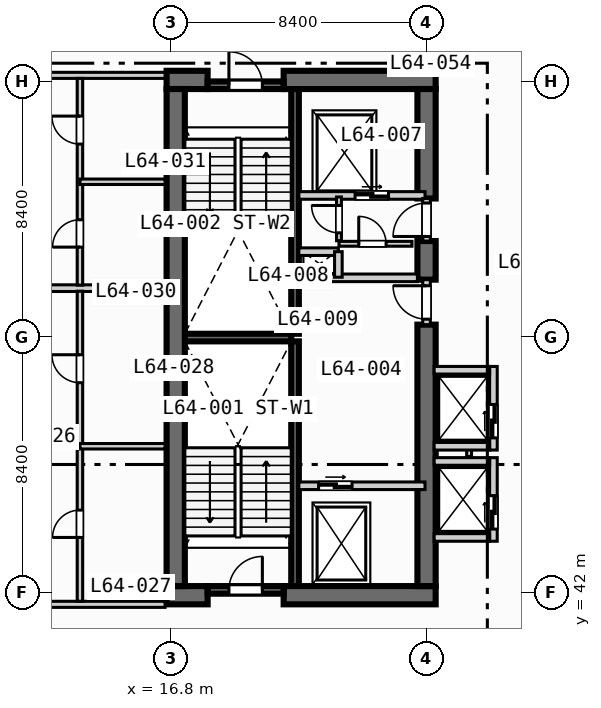
"""IFC4 building model, lengths in metres.
Left out: names, types, materials, properties, quantities, classifications, styles, units other than length and angle.
Written with IfcOpenShell. Run it as: python <this file> out.ifc"""

import sys

from ifc_helpers import new_model, si_unit, direction, frame, frame_2d, origin, place, context, subcontext, project, spatial, rectangle, extrude, element, fill, save


model = new_model("IFC4")
c1 = context("Model", 3, precision=1e-05, world=origin(), true_north=direction((0.0, 1.0)))
c2 = subcontext(c1, "Body", "Model", "MODEL_VIEW")
j1 = project(units=[si_unit("LENGTHUNIT", "METRE"), si_unit("PLANEANGLEUNIT", "RADIAN")], contexts=[c1])
p1 = place(None, origin())
s1 = spatial("IfcSite", under=j1, at=p1, CompositionType="ELEMENT")
p2 = place(p1, origin())
s2 = spatial("IfcBuilding", under=s1, at=p2, CompositionType="ELEMENT")
p3 = place(p2, frame((0.0, 0.0, 260.1)))
s3 = spatial("IfcBuildingStorey", under=s2, at=p3, CompositionType="ELEMENT", Elevation=260.1)
for number, where, z_axis, x_axis in (
    (1, (20.875, 42.2, 0.0), (0.0, 0.0, 1.0), (0.0, 1.0, 0.0)),
    (2, (20.875, 50.5, 0.0), (0.0, 0.0, 1.0), (0.0, 1.0, 0.0)),
):
    element("IfcWall", number, at=place(p3, frame(where, z_axis=z_axis, x_axis=x_axis)), inside=s3, PredefinedType="SOLIDWALL", context=c2, shape_type="SweptSolid", body=[
        extrude(rectangle(XDim=8.05, YDim=0.25, at=frame_2d((4.025, 0.0))), origin(), (0.0, 0.0, 1.0), 3.47),
    ])
p4 = place(p3, frame((17.25, 50.375, 0.0), z_axis=(0.0, 0.0, 1.0), x_axis=(1.0, 0.0, 0.0)))
e3 = element("IfcWall", 3, at=p4, inside=s3, PredefinedType="SOLIDWALL", context=c2, shape_type="SweptSolid", body=[
    extrude(rectangle(XDim=3.5, YDim=0.25, at=frame_2d((1.75, 0.0))), origin(), (0.0, 0.0, 1.0), 3.47),
])
p5 = place(p3, frame((16.65, 41.9, 0.0), z_axis=(0.0, 0.0, 1.0), x_axis=(1.0, 0.0, 0.0)))
e4 = element("IfcWall", 4, at=p5, inside=s3, PredefinedType="SHEAR", context=c2, shape_type="SweptSolid", body=[
    extrude(rectangle(XDim=1.35, YDim=0.6, at=frame_2d((0.675, 0.0))), origin(), (0.0, 0.0, 1.0), 3.47),
])
p6 = place(p3, frame((20.5, 41.9, 0.0), z_axis=(0.0, 0.0, 1.0), x_axis=(1.0, 0.0, 0.0)))
e5 = element("IfcWall", 5, at=p6, inside=s3, PredefinedType="SHEAR", context=c2, shape_type="SweptSolid", body=[
    extrude(rectangle(XDim=5.0, YDim=0.6, at=frame_2d((2.5, 0.0))), origin(), (0.0, 0.0, 1.0), 3.47),
])
p7 = place(p3, frame((16.65, 58.85, 0.0), z_axis=(0.0, 0.0, 1.0), x_axis=(1.0, 0.0, 0.0)))
e6 = element("IfcWall", 6, at=p7, inside=s3, PredefinedType="SHEAR", context=c2, shape_type="SweptSolid", body=[
    extrude(rectangle(XDim=1.35, YDim=0.6, at=frame_2d((0.675, 0.0))), origin(), (0.0, 0.0, 1.0), 3.47),
])
p8 = place(p3, frame((20.5, 58.85, 0.0), z_axis=(0.0, 0.0, 1.0), x_axis=(1.0, 0.0, 0.0)))
e7 = element("IfcWall", 7, at=p8, inside=s3, PredefinedType="SHEAR", context=c2, shape_type="SweptSolid", body=[
    extrude(rectangle(XDim=5.0, YDim=0.6, at=frame_2d((2.5, 0.0))), origin(), (0.0, 0.0, 1.0), 3.47),
])
p9 = place(p3, frame((16.95, 42.2, 0.0), z_axis=(0.0, 0.0, 1.0), x_axis=(0.0, 1.0, 0.0)))
e8 = element("IfcWall", 8, at=p9, inside=s3, PredefinedType="SHEAR", context=c2, shape_type="SweptSolid", body=[
    extrude(rectangle(XDim=16.35, YDim=0.6, at=frame_2d((8.175, 0.0))), origin(), (0.0, 0.0, 1.0), 3.47),
])
p10 = place(p3, frame((25.2, 42.2, 0.0), z_axis=(0.0, 0.0, 1.0), x_axis=(0.0, 1.0, 0.0)))
e9 = element("IfcWall", 9, at=p10, inside=s3, PredefinedType="SHEAR", context=c2, shape_type="SweptSolid", body=[
    extrude(rectangle(XDim=8.6, YDim=0.6, at=frame_2d((4.3, 0.0))), origin(), (0.0, 0.0, 1.0), 3.47),
])
p11 = place(p3, frame((25.2, 52.28, 0.0), z_axis=(0.0, 0.0, 1.0), x_axis=(0.0, 1.0, 0.0)))
e10 = element("IfcWall", 10, at=p11, inside=s3, PredefinedType="SHEAR", context=c2, shape_type="SweptSolid", body=[
    extrude(rectangle(XDim=1.27, YDim=0.6, at=frame_2d((0.635, 0.0))), origin(), (0.0, 0.0, 1.0), 3.47),
])
p12 = place(p3, frame((25.2, 54.95, 0.0), z_axis=(0.0, 0.0, 1.0), x_axis=(0.0, 1.0, 0.0)))
e11 = element("IfcWall", 11, at=p12, inside=s3, PredefinedType="SHEAR", context=c2, shape_type="SweptSolid", body=[
    extrude(rectangle(XDim=3.6, YDim=0.6, at=frame_2d((1.8, 0.0))), origin(), (0.0, 0.0, 1.0), 3.47),
])
p13 = place(p3, frame((18.0, 42.075, 0.0), z_axis=(0.0, 0.0, 1.0), x_axis=(1.0, 0.0, 0.0)))
e12 = element("IfcWall", 12, at=p13, inside=s3, PredefinedType="SOLIDWALL", context=c2, shape_type="SweptSolid", body=[
    extrude(rectangle(XDim=2.5, YDim=0.25, at=frame_2d((1.25, 0.0))), origin(), (0.0, 0.0, 1.0), 3.47),
])
p14 = place(p13, frame((0.7, 0.0, 0.0)))
e13 = element("IfcOpeningElement", 13, at=p14, cuts=e12, PredefinedType="OPENING", context=c2, shape_type="SweptSolid", body=[
    extrude(rectangle(XDim=1.1, YDim=2.15, at=frame_2d((0.55, 1.075))), frame((0.0, 0.135, 0.0), z_axis=(0.0, -1.0, 0.0), x_axis=(1.0, 0.0, 0.0)), (0.0, 0.0, 1.0), 0.27),
])
p15 = place(p3, frame((18.0, 58.675, 0.0), z_axis=(0.0, 0.0, 1.0), x_axis=(1.0, 0.0, 0.0)))
e14 = element("IfcWall", 14, at=p15, inside=s3, PredefinedType="SOLIDWALL", context=c2, shape_type="SweptSolid", body=[
    extrude(rectangle(XDim=2.5, YDim=0.25, at=frame_2d((1.25, 0.0))), origin(), (0.0, 0.0, 1.0), 3.47),
])
p16 = place(p15, frame((0.7, 0.0, 0.0)))
e15 = element("IfcOpeningElement", 15, at=p16, cuts=e14, PredefinedType="OPENING", context=c2, shape_type="SweptSolid", body=[
    extrude(rectangle(XDim=1.1, YDim=2.15, at=frame_2d((0.55, 1.075))), frame((0.0, 0.135, 0.0), z_axis=(0.0, -1.0, 0.0), x_axis=(1.0, 0.0, 0.0)), (0.0, 0.0, 1.0), 0.27),
])
p17 = place(p3, frame((21.0, 45.5, 0.0), z_axis=(0.0, 0.0, 1.0), x_axis=(1.0, 0.0, 0.0)))
e16 = element("IfcWall", 16, at=p17, inside=s3, PredefinedType="SOLIDWALL", context=c2, shape_type="SweptSolid", body=[
    extrude(rectangle(XDim=4.15, YDim=0.25, at=frame_2d((2.075, 0.0))), origin(), (0.0, 0.0, 1.0), 3.47),
])
p18 = place(p17, frame((0.65, 0.0, 0.0)))
e17 = element("IfcOpeningElement", 17, at=p18, cuts=e16, PredefinedType="OPENING", context=c2, shape_type="SweptSolid", body=[
    extrude(rectangle(XDim=1.1, YDim=2.15, at=frame_2d((0.55, 1.075))), frame((0.0, 0.135, 0.0), z_axis=(0.0, -1.0, 0.0), x_axis=(1.0, 0.0, 0.0)), (0.0, 0.0, 1.0), 0.27),
])
p19 = place(p3, frame((25.2, 50.8, 0.0), z_axis=(0.0, 0.0, 1.0), x_axis=(0.0, 1.0, 0.0)))
e18 = element("IfcWall", 18, at=p19, inside=s3, PredefinedType="SOLIDWALL", context=c2, shape_type="SweptSolid", body=[
    extrude(rectangle(XDim=1.48, YDim=0.25, at=frame_2d((0.74, 0.0))), origin(), (0.0, 0.0, 1.0), 3.47),
])
p20 = place(p19, frame((0.18, 0.0, 0.0)))
e19 = element("IfcOpeningElement", 19, at=p20, cuts=e18, PredefinedType="OPENING", context=c2, shape_type="SweptSolid", body=[
    extrude(rectangle(XDim=1.1, YDim=2.15, at=frame_2d((0.55, 1.075))), frame((0.0, 0.135, 0.0), z_axis=(0.0, -1.0, 0.0), x_axis=(1.0, 0.0, 0.0)), (0.0, 0.0, 1.0), 0.27),
])
p21 = place(p3, frame((21.0, 52.34, 0.0), z_axis=(0.0, 0.0, 1.0), x_axis=(1.0, 0.0, 0.0)))
e20 = element("IfcWall", 20, at=p21, inside=s3, PredefinedType="SOLIDWALL", context=c2, shape_type="SweptSolid", body=[
    extrude(rectangle(XDim=3.9, YDim=0.25, at=frame_2d((1.95, 0.0))), origin(), (0.0, 0.0, 1.0), 3.47),
])
p22 = place(p3, frame((21.0, 55.05, 0.0), z_axis=(0.0, 0.0, 1.0), x_axis=(1.0, 0.0, 0.0)))
e21 = element("IfcWall", 21, at=p22, inside=s3, PredefinedType="SOLIDWALL", context=c2, shape_type="SweptSolid", body=[
    extrude(rectangle(XDim=4.15, YDim=0.25, at=frame_2d((2.075, 0.0))), origin(), (0.0, 0.0, 1.0), 3.47),
])
p23 = place(p22, frame((1.85, 0.0, 0.0)))
e22 = element("IfcOpeningElement", 22, at=p23, cuts=e21, PredefinedType="OPENING", context=c2, shape_type="SweptSolid", body=[
    extrude(rectangle(XDim=1.1, YDim=2.15, at=frame_2d((0.55, 1.075))), frame((0.0, 0.135, 0.0), z_axis=(0.0, -1.0, 0.0), x_axis=(1.0, 0.0, 0.0)), (0.0, 0.0, 1.0), 0.27),
])
p24 = place(p3, frame((25.2, 53.55, 0.0), z_axis=(0.0, 0.0, 1.0), x_axis=(0.0, 1.0, 0.0)))
e23 = element("IfcWall", 23, at=p24, inside=s3, PredefinedType="SOLIDWALL", context=c2, shape_type="SweptSolid", body=[
    extrude(rectangle(XDim=1.4, YDim=0.25, at=frame_2d((0.7, 0.0))), origin(), (0.0, 0.0, 1.0), 3.47),
])
p25 = place(p24, frame((0.15, 0.0, 0.0)))
e24 = element("IfcOpeningElement", 24, at=p25, cuts=e23, PredefinedType="OPENING", context=c2, shape_type="SweptSolid", body=[
    extrude(rectangle(XDim=1.1, YDim=2.15, at=frame_2d((0.55, 1.075))), frame((0.0, 0.135, 0.0), z_axis=(0.0, -1.0, 0.0), x_axis=(1.0, 0.0, 0.0)), (0.0, 0.0, 1.0), 0.27),
])
p26 = place(p3, frame((21.0, 53.2, 0.0), z_axis=(0.0, 0.0, 1.0), x_axis=(1.0, 0.0, 0.0)))
e25 = element("IfcWall", 25, at=p26, inside=s3, PredefinedType="SOLIDWALL", context=c2, shape_type="SweptSolid", body=[
    extrude(rectangle(XDim=1.3, YDim=0.25, at=frame_2d((0.65, 0.0))), origin(), (0.0, 0.0, 1.0), 3.47),
])
p27 = place(p3, frame((22.3, 52.36, 0.0), z_axis=(0.0, 0.0, 1.0), x_axis=(0.0, 1.0, 0.0)))
e26 = element("IfcWall", 26, at=p27, inside=s3, PredefinedType="SOLIDWALL", context=c2, shape_type="SweptSolid", body=[
    extrude(rectangle(XDim=0.84, YDim=0.25, at=frame_2d((0.42, 0.0))), origin(), (0.0, 0.0, 1.0), 3.47),
])
p28 = place(p3, frame((22.32, 53.56, 0.0), z_axis=(0.0, 0.0, 1.0), x_axis=(0.0, 1.0, 0.0)))
e27 = element("IfcWall", 27, at=p28, inside=s3, PredefinedType="PARTITIONING", context=c2, shape_type="SweptSolid", body=[
    extrude(rectangle(XDim=1.44, YDim=0.16, at=frame_2d((0.72, 0.0))), origin(), (0.0, 0.0, 1.0), 3.47),
])
p29 = place(p28, frame((0.26, 0.0, 0.0)))
e28 = element("IfcOpeningElement", 28, at=p29, cuts=e27, PredefinedType="OPENING", context=c2, shape_type="SweptSolid", body=[
    extrude(rectangle(XDim=0.9, YDim=2.1, at=frame_2d((0.45, 1.05))), frame((0.0, 0.09, 0.0), z_axis=(0.0, -1.0, 0.0), x_axis=(1.0, 0.0, 0.0)), (0.0, 0.0, 1.0), 0.18),
])
p30 = place(p3, frame((22.32, 53.46, 0.0), z_axis=(0.0, 0.0, 1.0), x_axis=(1.0, 0.0, 0.0)))
e29 = element("IfcWall", 29, at=p30, inside=s3, PredefinedType="PARTITIONING", context=c2, shape_type="SweptSolid", body=[
    extrude(rectangle(XDim=2.4, YDim=0.16, at=frame_2d((1.2, 0.0))), origin(), (0.0, 0.0, 1.0), 3.47),
])
p31 = place(p30, frame((0.65, 0.0, 0.0)))
e30 = element("IfcOpeningElement", 30, at=p31, cuts=e29, PredefinedType="OPENING", context=c2, shape_type="SweptSolid", body=[
    extrude(rectangle(XDim=0.9, YDim=2.1, at=frame_2d((0.45, 1.05))), frame((0.0, 0.09, 0.0), z_axis=(0.0, -1.0, 0.0), x_axis=(1.0, 0.0, 0.0)), (0.0, 0.0, 1.0), 0.18),
])
p32 = place(p3, frame((27.4, 43.675, 0.0), z_axis=(0.0, 0.0, 1.0), x_axis=(0.0, 1.0, 0.0)))
e31 = element("IfcWall", 31, at=p32, inside=s3, PredefinedType="SOLIDWALL", context=c2, shape_type="SweptSolid", body=[
    extrude(rectangle(XDim=2.75, YDim=0.25, at=frame_2d((1.375, 0.0))), origin(), (0.0, 0.0, 1.0), 3.47),
])
p33 = place(p32, frame((0.4, 0.0, 0.0)))
e32 = element("IfcOpeningElement", 32, at=p33, cuts=e31, PredefinedType="OPENING", context=c2, shape_type="SweptSolid", body=[
    extrude(rectangle(XDim=1.1, YDim=2.15, at=frame_2d((0.55, 1.075))), frame((0.0, 0.135, 0.0), z_axis=(0.0, -1.0, 0.0), x_axis=(1.0, 0.0, 0.0)), (0.0, 0.0, 1.0), 0.27),
])
for number, where, z_axis, x_axis in (
    (33, (25.45, 43.8, 0.0), (0.0, 0.0, 1.0), (1.0, 0.0, 0.0)),
    (34, (25.45, 46.3, 0.0), (0.0, 0.0, 1.0), (1.0, 0.0, 0.0)),
):
    element("IfcWall", number, at=place(p3, frame(where, z_axis=z_axis, x_axis=x_axis)), inside=s3, PredefinedType="SOLIDWALL", context=c2, shape_type="SweptSolid", body=[
        extrude(rectangle(XDim=1.825, YDim=0.25, at=frame_2d((0.913, 0.0))), origin(), (0.0, 0.0, 1.0), 3.47),
    ])
p34 = place(p3, frame((26.6, 46.46, 0.0), z_axis=(0.0, 0.0, 1.0), x_axis=(0.0, 1.0, 0.0)))
e35 = element("IfcWall", 35, at=p34, inside=s3, PredefinedType="PARTITIONING", context=c2, shape_type="SweptSolid", body=[
    extrude(rectangle(XDim=0.88, YDim=0.16, at=frame_2d((0.44, 0.0))), origin(), (0.0, 0.0, 1.0), 3.47),
])
p35 = place(p3, frame((27.4, 46.675, 0.0), z_axis=(0.0, 0.0, 1.0), x_axis=(0.0, 1.0, 0.0)))
e36 = element("IfcWall", 36, at=p35, inside=s3, PredefinedType="SOLIDWALL", context=c2, shape_type="SweptSolid", body=[
    extrude(rectangle(XDim=2.75, YDim=0.25, at=frame_2d((1.375, 0.0))), origin(), (0.0, 0.0, 1.0), 3.47),
])
p36 = place(p35, frame((0.4, 0.0, 0.0)))
e37 = element("IfcOpeningElement", 37, at=p36, cuts=e36, PredefinedType="OPENING", context=c2, shape_type="SweptSolid", body=[
    extrude(rectangle(XDim=1.1, YDim=2.15, at=frame_2d((0.55, 1.075))), frame((0.0, 0.135, 0.0), z_axis=(0.0, -1.0, 0.0), x_axis=(1.0, 0.0, 0.0)), (0.0, 0.0, 1.0), 0.27),
])
for number, where, z_axis, x_axis in (
    (38, (25.45, 46.8, 0.0), (0.0, 0.0, 1.0), (1.0, 0.0, 0.0)),
    (39, (25.45, 49.3, 0.0), (0.0, 0.0, 1.0), (1.0, 0.0, 0.0)),
):
    element("IfcWall", number, at=place(p3, frame(where, z_axis=z_axis, x_axis=x_axis)), inside=s3, PredefinedType="SOLIDWALL", context=c2, shape_type="SweptSolid", body=[
        extrude(rectangle(XDim=1.825, YDim=0.25, at=frame_2d((0.913, 0.0))), origin(), (0.0, 0.0, 1.0), 3.47),
    ])
p37 = place(p3, frame((8.65, 41.6, 0.0), z_axis=(0.0, 0.0, 1.0), x_axis=(1.0, 0.0, 0.0)))
e40 = element("IfcWall", 40, at=p37, inside=s3, PredefinedType="PARTITIONING", context=c2, shape_type="SweptSolid", body=[
    extrude(rectangle(XDim=7.95, YDim=0.2, at=frame_2d((3.975, 0.0))), origin(), (0.0, 0.0, 1.0), 3.47),
])
p38 = place(p37, frame((2.0, 0.0, 0.0)))
e41 = element("IfcOpeningElement", 41, at=p38, cuts=e40, PredefinedType="OPENING", context=c2, shape_type="SweptSolid", body=[
    extrude(rectangle(XDim=1.0, YDim=2.15, at=frame_2d((0.5, 1.075))), frame((0.0, 0.11, 0.0), z_axis=(0.0, -1.0, 0.0), x_axis=(1.0, 0.0, 0.0)), (0.0, 0.0, 1.0), 0.22),
])
p39 = place(p3, frame((8.65, 59.0, 0.0), z_axis=(0.0, 0.0, 1.0), x_axis=(1.0, 0.0, 0.0)))
e42 = element("IfcWall", 42, at=p39, inside=s3, PredefinedType="PARTITIONING", context=c2, shape_type="SweptSolid", body=[
    extrude(rectangle(XDim=7.95, YDim=0.2, at=frame_2d((3.975, 0.0))), origin(), (0.0, 0.0, 1.0), 2.82),
])
p40 = place(p39, frame((2.0, 0.0, 0.0)))
e43 = element("IfcOpeningElement", 43, at=p40, cuts=e42, PredefinedType="OPENING", context=c2, shape_type="SweptSolid", body=[
    extrude(rectangle(XDim=1.0, YDim=2.15, at=frame_2d((0.5, 1.075))), frame((0.0, 0.11, 0.0), z_axis=(0.0, -1.0, 0.0), x_axis=(1.0, 0.0, 0.0)), (0.0, 0.0, 1.0), 0.22),
])
p41 = place(p3, frame((8.65, 52.0, 0.0), z_axis=(0.0, 0.0, 1.0), x_axis=(1.0, 0.0, 0.0)))
e44 = element("IfcWall", 44, at=p41, inside=s3, PredefinedType="PARTITIONING", context=c2, shape_type="SweptSolid", body=[
    extrude(rectangle(XDim=7.95, YDim=0.22, at=frame_2d((3.975, 0.0))), origin(), (0.0, 0.0, 1.0), 3.47),
])
p42 = place(p3, frame((13.8, 41.7, 0.0), z_axis=(0.0, 0.0, 1.0), x_axis=(0.0, 1.0, 0.0)))
e45 = element("IfcWall", 45, at=p42, inside=s3, PredefinedType="PLUMBINGWALL", context=c2, shape_type="SweptSolid", body=[
    extrude(rectangle(XDim=10.2, YDim=0.18, at=frame_2d((5.1, 0.0))), origin(), (0.0, 0.0, 1.0), 3.47),
])
p43 = place(p42, frame((2.1, 0.0, 0.0)))
e46 = element("IfcOpeningElement", 46, at=p43, cuts=e45, PredefinedType="OPENING", context=c2, shape_type="SweptSolid", body=[
    extrude(rectangle(XDim=0.9, YDim=2.1, at=frame_2d((0.45, 1.05))), frame((0.0, 0.1, 0.0), z_axis=(0.0, -1.0, 0.0), x_axis=(1.0, 0.0, 0.0)), (0.0, 0.0, 1.0), 0.2),
])
p44 = place(p42, frame((7.19, 0.0, 0.0)))
e47 = element("IfcOpeningElement", 47, at=p44, cuts=e45, PredefinedType="OPENING", context=c2, shape_type="SweptSolid", body=[
    extrude(rectangle(XDim=0.92, YDim=2.1, at=frame_2d((0.46, 1.05))), frame((0.0, 0.1, 0.0), z_axis=(0.0, -1.0, 0.0), x_axis=(1.0, 0.0, 0.0)), (0.0, 0.0, 1.0), 0.2),
])
p45 = place(p3, frame((13.8, 46.8, 0.0), z_axis=(0.0, 0.0, 1.0), x_axis=(1.0, 0.0, 0.0)))
e48 = element("IfcWall", 48, at=p45, inside=s3, PredefinedType="PLUMBINGWALL", context=c2, shape_type="SweptSolid", body=[
    extrude(rectangle(XDim=2.8, YDim=0.18, at=frame_2d((1.4, 0.0))), origin(), (0.0, 0.0, 1.0), 3.47),
])
p46 = place(p3, frame((13.8, 52.1, 0.0), z_axis=(0.0, 0.0, 1.0), x_axis=(0.0, 1.0, 0.0)))
e49 = element("IfcWall", 49, at=p46, inside=s3, PredefinedType="PLUMBINGWALL", context=c2, shape_type="SweptSolid", body=[
    extrude(rectangle(XDim=6.8, YDim=0.18, at=frame_2d((3.4, 0.0))), origin(), (0.0, 0.0, 1.0), 3.47),
])
p47 = place(p46, frame((1.25, 0.0, 0.0)))
e50 = element("IfcOpeningElement", 50, at=p47, cuts=e49, PredefinedType="OPENING", context=c2, shape_type="SweptSolid", body=[
    extrude(rectangle(XDim=0.9, YDim=2.1, at=frame_2d((0.45, 1.05))), frame((0.0, 0.1, 0.0), z_axis=(0.0, -1.0, 0.0), x_axis=(1.0, 0.0, 0.0)), (0.0, 0.0, 1.0), 0.2),
])
p48 = place(p46, frame((4.64, 0.0, 0.0)))
e51 = element("IfcOpeningElement", 51, at=p48, cuts=e49, PredefinedType="OPENING", context=c2, shape_type="SweptSolid", body=[
    extrude(rectangle(XDim=0.92, YDim=2.1, at=frame_2d((0.46, 1.05))), frame((0.0, 0.1, 0.0), z_axis=(0.0, -1.0, 0.0), x_axis=(1.0, 0.0, 0.0)), (0.0, 0.0, 1.0), 0.2),
])
p49 = place(p3, frame((13.8, 55.5, 0.0), z_axis=(0.0, 0.0, 1.0), x_axis=(1.0, 0.0, 0.0)))
e52 = element("IfcWall", 52, at=p49, inside=s3, PredefinedType="PLUMBINGWALL", context=c2, shape_type="SweptSolid", body=[
    extrude(rectangle(XDim=2.8, YDim=0.18, at=frame_2d((1.4, 0.0))), origin(), (0.0, 0.0, 1.0), 3.47),
])
p50 = place(p14, origin())
e53 = element("IfcDoor", 53, at=p50, inside=s3, OperationType="SINGLE_SWING_RIGHT", PredefinedType="DOOR", context=c2, shape_type="SweptSolid", body=[
    extrude(rectangle(XDim=1.1, YDim=2.15, at=frame_2d((0.55, 1.075))), frame((0.0, 0.025, 0.0), z_axis=(0.0, -1.0, 0.0), x_axis=(1.0, 0.0, 0.0)), (0.0, 0.0, 1.0), 0.05),
])
fill(e13, e53)
p51 = place(p16, origin())
e54 = element("IfcDoor", 54, at=p51, inside=s3, OperationType="SINGLE_SWING_LEFT", PredefinedType="DOOR", context=c2, shape_type="SweptSolid", body=[
    extrude(rectangle(XDim=1.1, YDim=2.15, at=frame_2d((0.55, 1.075))), frame((0.0, 0.025, 0.0), z_axis=(0.0, -1.0, 0.0), x_axis=(1.0, 0.0, 0.0)), (0.0, 0.0, 1.0), 0.05),
])
fill(e15, e54)
p52 = place(p18, origin())
e55 = element("IfcDoor", 55, at=p52, inside=s3, OperationType="SLIDING_TO_LEFT", PredefinedType="DOOR", context=c2, shape_type="SweptSolid", body=[
    extrude(rectangle(XDim=1.1, YDim=2.15, at=frame_2d((0.55, 1.075))), frame((0.0, 0.025, 0.0), z_axis=(0.0, -1.0, 0.0), x_axis=(1.0, 0.0, 0.0)), (0.0, 0.0, 1.0), 0.05),
])
fill(e17, e55)
p53 = place(p20, origin())
e56 = element("IfcDoor", 56, at=p53, inside=s3, OperationType="SINGLE_SWING_RIGHT", PredefinedType="DOOR", context=c2, shape_type="SweptSolid", body=[
    extrude(rectangle(XDim=1.1, YDim=2.15, at=frame_2d((0.55, 1.075))), frame((0.0, 0.025, 0.0), z_axis=(0.0, -1.0, 0.0), x_axis=(1.0, 0.0, 0.0)), (0.0, 0.0, 1.0), 0.05),
])
fill(e19, e56)
p54 = place(p23, origin())
e57 = element("IfcDoor", 57, at=p54, inside=s3, OperationType="SLIDING_TO_LEFT", PredefinedType="DOOR", context=c2, shape_type="SweptSolid", body=[
    extrude(rectangle(XDim=1.1, YDim=2.15, at=frame_2d((0.55, 1.075))), frame((0.0, 0.025, 0.0), z_axis=(0.0, -1.0, 0.0), x_axis=(1.0, 0.0, 0.0)), (0.0, 0.0, 1.0), 0.05),
])
fill(e22, e57)
p55 = place(p25, origin())
e58 = element("IfcDoor", 58, at=p55, inside=s3, OperationType="SINGLE_SWING_LEFT", PredefinedType="DOOR", context=c2, shape_type="SweptSolid", body=[
    extrude(rectangle(XDim=1.1, YDim=2.15, at=frame_2d((0.55, 1.075))), frame((0.0, 0.025, 0.0), z_axis=(0.0, -1.0, 0.0), x_axis=(1.0, 0.0, 0.0)), (0.0, 0.0, 1.0), 0.05),
])
fill(e24, e58)
p56 = place(p29, origin())
e59 = element("IfcDoor", 59, at=p56, inside=s3, OperationType="SINGLE_SWING_RIGHT", PredefinedType="DOOR", context=c2, shape_type="SweptSolid", body=[
    extrude(rectangle(XDim=0.9, YDim=2.1, at=frame_2d((0.45, 1.05))), frame((0.0, 0.025, 0.0), z_axis=(0.0, -1.0, 0.0), x_axis=(1.0, 0.0, 0.0)), (0.0, 0.0, 1.0), 0.05),
])
fill(e28, e59)
p57 = place(p31, origin())
e60 = element("IfcDoor", 60, at=p57, inside=s3, OperationType="SINGLE_SWING_LEFT", PredefinedType="DOOR", context=c2, shape_type="SweptSolid", body=[
    extrude(rectangle(XDim=0.9, YDim=2.1, at=frame_2d((0.45, 1.05))), frame((0.0, 0.025, 0.0), z_axis=(0.0, -1.0, 0.0), x_axis=(1.0, 0.0, 0.0)), (0.0, 0.0, 1.0), 0.05),
])
fill(e30, e60)
p58 = place(p33, origin())
e61 = element("IfcDoor", 61, at=p58, inside=s3, OperationType="SLIDING_TO_LEFT", PredefinedType="DOOR", context=c2, shape_type="SweptSolid", body=[
    extrude(rectangle(XDim=1.1, YDim=2.15, at=frame_2d((0.55, 1.075))), frame((0.0, 0.025, 0.0), z_axis=(0.0, -1.0, 0.0), x_axis=(1.0, 0.0, 0.0)), (0.0, 0.0, 1.0), 0.05),
])
fill(e32, e61)
p59 = place(p36, origin())
e62 = element("IfcDoor", 62, at=p59, inside=s3, OperationType="SLIDING_TO_LEFT", PredefinedType="DOOR", context=c2, shape_type="SweptSolid", body=[
    extrude(rectangle(XDim=1.1, YDim=2.15, at=frame_2d((0.55, 1.075))), frame((0.0, 0.025, 0.0), z_axis=(0.0, -1.0, 0.0), x_axis=(1.0, 0.0, 0.0)), (0.0, 0.0, 1.0), 0.05),
])
fill(e37, e62)
p60 = place(p43, origin())
e63 = element("IfcDoor", 63, at=p60, inside=s3, OperationType="SINGLE_SWING_LEFT", PredefinedType="DOOR", context=c2, shape_type="SweptSolid", body=[
    extrude(rectangle(XDim=0.9, YDim=2.1, at=frame_2d((0.45, 1.05))), frame((0.0, 0.025, 0.0), z_axis=(0.0, -1.0, 0.0), x_axis=(1.0, 0.0, 0.0)), (0.0, 0.0, 1.0), 0.05),
])
fill(e46, e63)
p61 = place(p44, origin())
e64 = element("IfcDoor", 64, at=p61, inside=s3, OperationType="SINGLE_SWING_RIGHT", PredefinedType="DOOR", context=c2, shape_type="SweptSolid", body=[
    extrude(rectangle(XDim=0.92, YDim=2.1, at=frame_2d((0.46, 1.05))), frame((0.0, 0.025, 0.0), z_axis=(0.0, -1.0, 0.0), x_axis=(1.0, 0.0, 0.0)), (0.0, 0.0, 1.0), 0.05),
])
fill(e47, e64)
p62 = place(p47, origin())
e65 = element("IfcDoor", 65, at=p62, inside=s3, OperationType="SINGLE_SWING_LEFT", PredefinedType="DOOR", context=c2, shape_type="SweptSolid", body=[
    extrude(rectangle(XDim=0.9, YDim=2.1, at=frame_2d((0.45, 1.05))), frame((0.0, 0.025, 0.0), z_axis=(0.0, -1.0, 0.0), x_axis=(1.0, 0.0, 0.0)), (0.0, 0.0, 1.0), 0.05),
])
fill(e50, e65)
p63 = place(p48, origin())
e66 = element("IfcDoor", 66, at=p63, inside=s3, OperationType="SINGLE_SWING_RIGHT", PredefinedType="DOOR", context=c2, shape_type="SweptSolid", body=[
    extrude(rectangle(XDim=0.92, YDim=2.1, at=frame_2d((0.46, 1.05))), frame((0.0, 0.025, 0.0), z_axis=(0.0, -1.0, 0.0), x_axis=(1.0, 0.0, 0.0)), (0.0, 0.0, 1.0), 0.05),
])
fill(e51, e66)
save(model, sys.argv[1])
